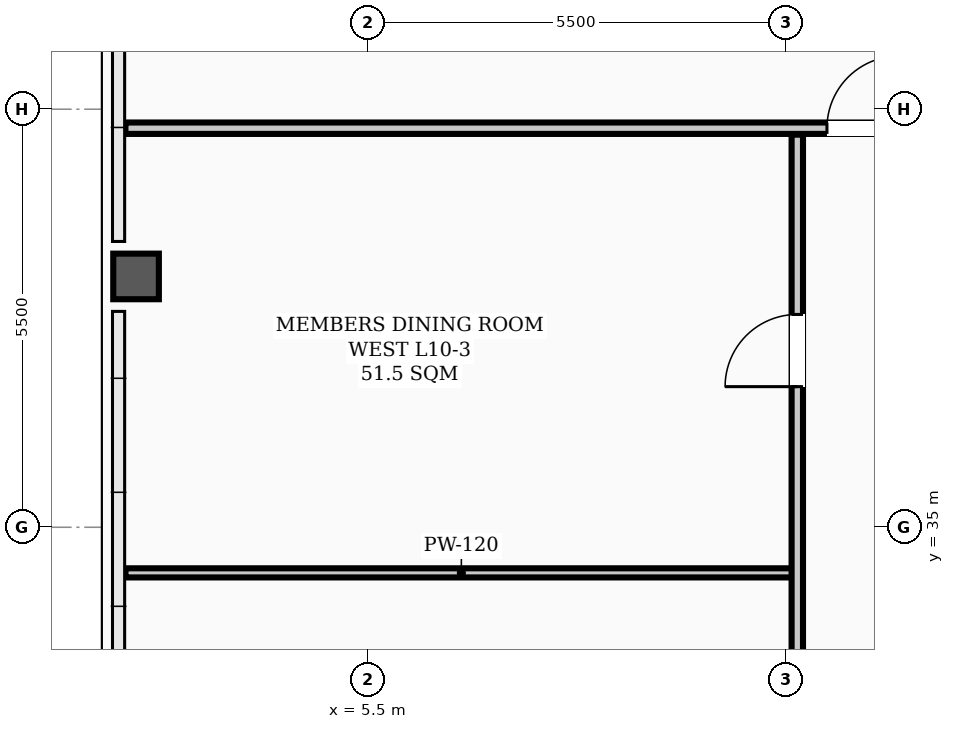
"""IFC4 building model, lengths in metres.
Left out: names, types, materials, properties, quantities, classifications, styles, units other than length and angle.
Written with IfcOpenShell. Run it as: python <this file> out.ifc"""

import sys

from ifc_helpers import new_model, si_unit, direction, frame, frame_2d, origin, origin_2d, place, context, subcontext, project, spatial, rectangle, hollow_rectangle, extrude, element, fill, save


model = new_model("IFC4")
c1 = context("Model", 3, precision=1e-05, world=origin(), true_north=direction((0.0, 1.0)))
c2 = subcontext(c1, "Body", "Model", "MODEL_VIEW")
j1 = project(units=[si_unit("LENGTHUNIT", "METRE"), si_unit("PLANEANGLEUNIT", "RADIAN")], contexts=[c1])
p1 = place(None, origin())
s1 = spatial("IfcSite", under=j1, at=p1, CompositionType="ELEMENT")
p2 = place(p1, origin())
s2 = spatial("IfcBuilding", under=s1, at=p2, CompositionType="ELEMENT")
p3 = place(p2, frame((0.0, 0.0, 42.1)))
s3 = spatial("IfcBuildingStorey", under=s2, at=p3, CompositionType="ELEMENT", Elevation=42.1)
p4 = place(p3, frame((2.45, 38.3, 0.0), z_axis=(0.0, 0.0, 1.0), x_axis=(1.0, 0.0, 0.0)))
e1 = element("IfcColumn", 1, at=p4, inside=s3, PredefinedType="COLUMN", context=c2, shape_type="SweptSolid", body=[
    extrude(hollow_rectangle(XDim=0.6, YDim=0.6, WallThickness=0.026, InnerFilletRadius=0.013, OuterFilletRadius=0.039, at=origin_2d()), origin(), (0.0, 0.0, 1.0), 3.9),
])
p5 = place(p3, frame((2.31, 34.4, 0.0), z_axis=(0.0, 0.0, 1.0), x_axis=(1.0, 0.0, 0.0)))
e2 = element("IfcWall", 2, at=p5, inside=s3, PredefinedType="PARTITIONING", context=c2, shape_type="SweptSolid", body=[
    extrude(rectangle(XDim=8.84, YDim=0.12, at=frame_2d((4.42, 0.0))), origin(), (0.0, 0.0, 1.0), 3.212),
])
p6 = place(p3, frame((2.31, 40.25, 0.0), z_axis=(0.0, 0.0, 1.0), x_axis=(1.0, 0.0, 0.0)))
e3 = element("IfcWall", 3, at=p6, inside=s3, PredefinedType="PARTITIONING", context=c2, shape_type="SweptSolid", body=[
    extrude(rectangle(XDim=49.38, YDim=0.15, at=frame_2d((24.69, 0.0))), origin(), (0.0, 0.0, 1.0), 3.1),
])
p7 = place(p6, frame((9.23, 0.0, 0.0)))
e4 = element("IfcOpeningElement", 4, at=p7, cuts=e3, PredefinedType="OPENING", context=c2, shape_type="SweptSolid", body=[
    extrude(rectangle(XDim=0.95, YDim=2.08, at=frame_2d((0.475, 1.04))), frame((0.0, 0.085, 0.0), z_axis=(0.0, -1.0, 0.0), x_axis=(1.0, 0.0, 0.0)), (0.0, 0.0, 1.0), 0.17),
])
p8 = place(p6, frame((23.115, 0.0, 0.0)))
e5 = element("IfcOpeningElement", 5, at=p8, cuts=e3, PredefinedType="OPENING", context=c2, shape_type="SweptSolid", body=[
    extrude(rectangle(XDim=0.95, YDim=2.08, at=frame_2d((0.475, 1.04))), frame((0.0, 0.085, 0.0), z_axis=(0.0, -1.0, 0.0), x_axis=(1.0, 0.0, 0.0)), (0.0, 0.0, 1.0), 0.17),
])
p9 = place(p6, frame((31.515, 0.0, 0.0)))
e6 = element("IfcOpeningElement", 6, at=p9, cuts=e3, PredefinedType="OPENING", context=c2, shape_type="SweptSolid", body=[
    extrude(rectangle(XDim=0.95, YDim=2.08, at=frame_2d((0.475, 1.04))), frame((0.0, 0.085, 0.0), z_axis=(0.0, -1.0, 0.0), x_axis=(1.0, 0.0, 0.0)), (0.0, 0.0, 1.0), 0.17),
])
p10 = place(p6, frame((42.7, 0.0, 0.0)))
e7 = element("IfcOpeningElement", 7, at=p10, cuts=e3, PredefinedType="OPENING", context=c2, shape_type="SweptSolid", body=[
    extrude(rectangle(XDim=0.95, YDim=2.08, at=frame_2d((0.475, 1.04))), frame((0.0, 0.085, 0.0), z_axis=(0.0, -1.0, 0.0), x_axis=(1.0, 0.0, 0.0)), (0.0, 0.0, 1.0), 0.17),
])
p11 = place(p3, frame((11.15, 17.635, 0.0), z_axis=(0.0, 0.0, 1.0), x_axis=(0.0, 1.0, 0.0)))
e8 = element("IfcWall", 8, at=p11, inside=s3, PredefinedType="PARTITIONING", context=c2, shape_type="SweptSolid", body=[
    extrude(rectangle(XDim=22.53, YDim=0.15, at=frame_2d((11.265, 0.0))), origin(), (0.0, 0.0, 1.0), 3.0),
])
p12 = place(p11, frame((4.565, 0.0, 0.0)))
e9 = element("IfcOpeningElement", 9, at=p12, cuts=e8, PredefinedType="OPENING", context=c2, shape_type="SweptSolid", body=[
    extrude(rectangle(XDim=0.95, YDim=2.08, at=frame_2d((0.475, 1.04))), frame((0.0, 0.085, 0.0), z_axis=(0.0, -1.0, 0.0), x_axis=(1.0, 0.0, 0.0)), (0.0, 0.0, 1.0), 0.17),
])
p13 = place(p11, frame((12.99, 0.0, 0.0)))
e10 = element("IfcOpeningElement", 10, at=p13, cuts=e8, PredefinedType="OPENING", context=c2, shape_type="SweptSolid", body=[
    extrude(rectangle(XDim=0.95, YDim=2.08, at=frame_2d((0.475, 1.04))), frame((0.0, 0.085, 0.0), z_axis=(0.0, -1.0, 0.0), x_axis=(1.0, 0.0, 0.0)), (0.0, 0.0, 1.0), 0.17),
])
p14 = place(p11, frame((19.215, 0.0, 0.0)))
e11 = element("IfcOpeningElement", 11, at=p14, cuts=e8, PredefinedType="OPENING", context=c2, shape_type="SweptSolid", body=[
    extrude(rectangle(XDim=0.95, YDim=2.08, at=frame_2d((0.475, 1.04))), frame((0.0, 0.085, 0.0), z_axis=(0.0, -1.0, 0.0), x_axis=(1.0, 0.0, 0.0)), (0.0, 0.0, 1.0), 0.17),
])
p15 = place(p14, origin())
e12 = element("IfcDoor", 12, at=p15, inside=s3, OperationType="SINGLE_SWING_LEFT", PredefinedType="DOOR", context=c2, shape_type="SweptSolid", body=[
    extrude(rectangle(XDim=0.95, YDim=2.08, at=frame_2d((0.475, 1.04))), frame((0.0, 0.025, 0.0), z_axis=(0.0, -1.0, 0.0), x_axis=(1.0, 0.0, 0.0)), (0.0, 0.0, 1.0), 0.05),
])
fill(e11, e12)
p16 = place(p7, origin())
e13 = element("IfcDoor", 13, at=p16, inside=s3, OperationType="SINGLE_SWING_RIGHT", PredefinedType="DOOR", context=c2, shape_type="SweptSolid", body=[
    extrude(rectangle(XDim=0.95, YDim=2.08, at=frame_2d((0.475, 1.04))), frame((0.0, 0.025, 0.0), z_axis=(0.0, -1.0, 0.0), x_axis=(1.0, 0.0, 0.0)), (0.0, 0.0, 1.0), 0.05),
])
fill(e4, e13)
save(model, sys.argv[1])
